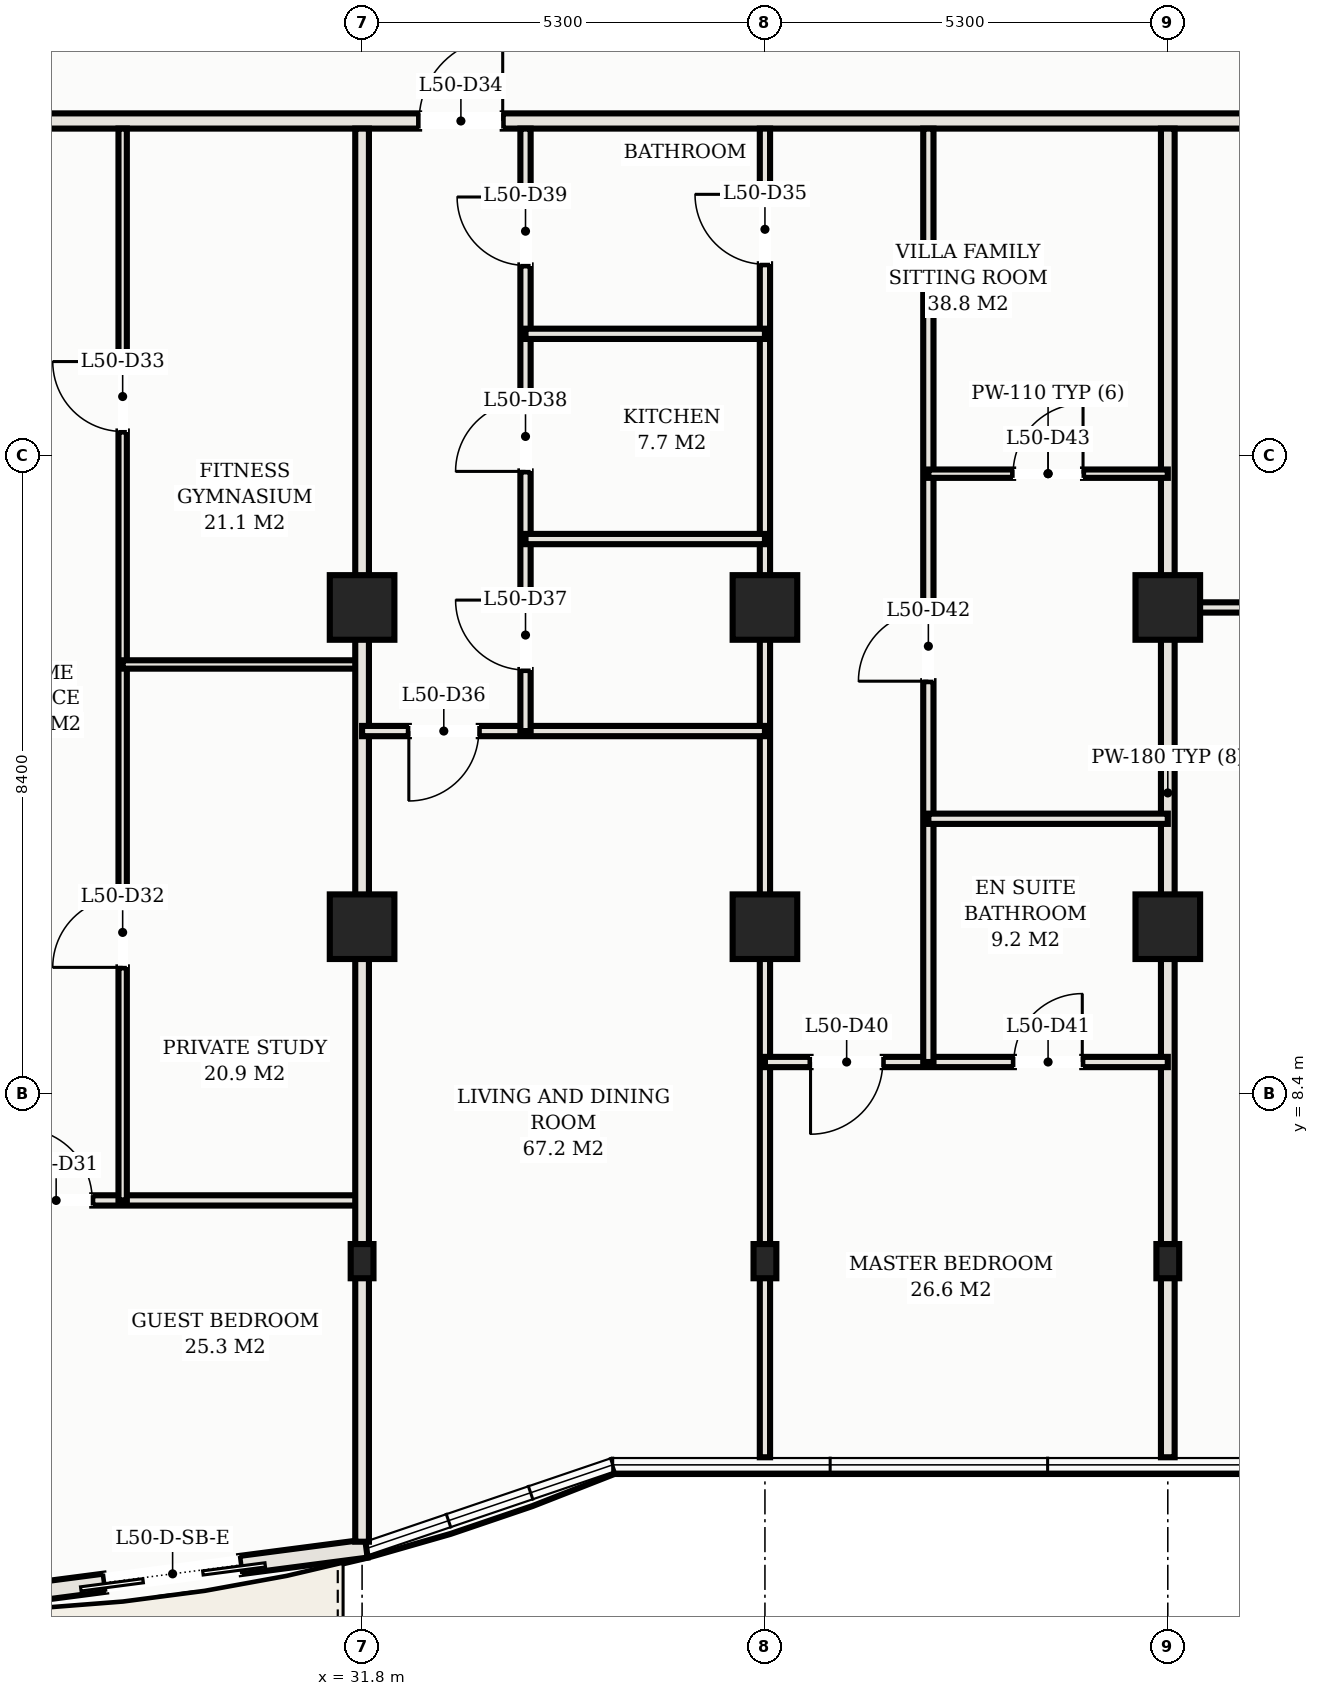
"""IFC4 building model, lengths in metres.
Left out: names, types, materials, properties, quantities, classifications, styles, units other than length and angle.
Written with IfcOpenShell. Run it as: python <this file> out.ifc"""

import sys

from ifc_helpers import new_model, si_unit, direction, frame, frame_2d, origin, origin_2d, place, context, subcontext, project, spatial, rectangle, hollow_rectangle, extrude, element, fill, save


model = new_model("IFC4")
c1 = context("Model", 3, precision=1e-05, world=origin(), true_north=direction((0.0, 1.0)))
c2 = subcontext(c1, "Body", "Model", "MODEL_VIEW")
j1 = project(units=[si_unit("LENGTHUNIT", "METRE"), si_unit("PLANEANGLEUNIT", "RADIAN")], contexts=[c1])
p1 = place(None, origin())
s1 = spatial("IfcSite", under=j1, at=p1, CompositionType="ELEMENT")
p2 = place(p1, origin())
s2 = spatial("IfcBuilding", under=s1, at=p2, CompositionType="ELEMENT")
p3 = place(p2, frame((0.0, 0.0, 182.1)))
s3 = spatial("IfcBuildingStorey", under=s2, at=p3, CompositionType="ELEMENT", Elevation=182.1)
for number, where, z_axis, x_axis in (
    (1, (31.8, 14.8, 0.0), (0.0, 0.0, 1.0), (1.0, 0.0, 0.0)),
    (2, (31.8, 10.6, 0.0), (0.0, 0.0, 1.0), (1.0, 0.0, 0.0)),
    (3, (37.1, 14.8, 0.0), (0.0, 0.0, 1.0), (1.0, 0.0, 0.0)),
    (4, (37.1, 10.6, 0.0), (0.0, 0.0, 1.0), (1.0, 0.0, 0.0)),
    (5, (42.4, 14.8, 0.0), (0.0, 0.0, 1.0), (1.0, 0.0, 0.0)),
    (6, (42.4, 10.6, 0.0), (0.0, 0.0, 1.0), (1.0, 0.0, 0.0)),
):
    element("IfcColumn", number, at=place(p3, frame(where, z_axis=z_axis, x_axis=x_axis)), inside=s3, PredefinedType="COLUMN", context=c2, shape_type="SweptSolid", body=[
        extrude(hollow_rectangle(XDim=0.85, YDim=0.85, WallThickness=0.028, at=origin_2d()), origin(), (0.0, 0.0, 1.0), 3.3),
    ])
for number, where, z_axis, x_axis in (
    (7, (31.8, 6.2, 0.0), (0.0, 0.0, 1.0), (1.0, 0.0, 0.0)),
    (8, (37.1, 6.2, 0.0), (0.0, 0.0, 1.0), (1.0, 0.0, 0.0)),
    (9, (42.4, 6.2, 0.0), (0.0, 0.0, 1.0), (1.0, 0.0, 0.0)),
):
    element("IfcColumn", number, at=place(p3, frame(where, z_axis=z_axis, x_axis=x_axis)), inside=s3, PredefinedType="COLUMN", context=c2, shape_type="SweptSolid", body=[
        extrude(hollow_rectangle(XDim=0.3, YDim=0.45, WallThickness=0.016, at=origin_2d()), origin(), (0.0, 0.0, 1.0), 3.3),
    ])
p4 = place(p3, frame((26.5, 1.72, 0.0), z_axis=(0.0, 0.0, 1.0), x_axis=(0.991594614239, 0.129383619568, 0.0)))
e10 = element("IfcWall", 10, at=p4, inside=s3, PredefinedType="SOLIDWALL", context=c2, shape_type="SweptSolid", body=[
    extrude(rectangle(XDim=5.402, YDim=0.24, at=frame_2d((2.701, 0.0))), origin(), (0.0, 0.0, 1.0), 3.03),
])
p5 = place(p4, frame((1.931, 0.0, 0.0)))
e11 = element("IfcOpeningElement", 11, at=p5, cuts=e10, PredefinedType="OPENING", context=c2, shape_type="SweptSolid", body=[
    extrude(rectangle(XDim=1.8, YDim=2.2, at=frame_2d((0.9, 1.1))), frame((0.0, 0.13, 0.0), z_axis=(0.0, -1.0, 0.0), x_axis=(1.0, 0.0, 0.0)), (0.0, 0.0, 1.0), 0.26),
])
p6 = place(p3, frame((4.32, 21.2, 0.0), z_axis=(0.0, 0.0, 1.0), x_axis=(1.0, 0.0, 0.0)))
e12 = element("IfcWall", 12, at=p6, inside=s3, PredefinedType="PARTITIONING", context=c2, shape_type="SweptSolid", body=[
    extrude(rectangle(XDim=44.36, YDim=0.2, at=frame_2d((22.18, 0.0))), origin(), (0.0, 0.0, 1.0), 2.57),
])
p7 = place(p6, frame((7.03, 0.0, 0.0)))
e13 = element("IfcOpeningElement", 13, at=p7, cuts=e12, PredefinedType="OPENING", context=c2, shape_type="SweptSolid", body=[
    extrude(rectangle(XDim=1.1, YDim=2.25, at=frame_2d((0.55, 1.125))), frame((0.0, 0.11, 0.0), z_axis=(0.0, -1.0, 0.0), x_axis=(1.0, 0.0, 0.0)), (0.0, 0.0, 1.0), 0.22),
])
p8 = place(p6, frame((28.23, 0.0, 0.0)))
e14 = element("IfcOpeningElement", 14, at=p8, cuts=e12, PredefinedType="OPENING", context=c2, shape_type="SweptSolid", body=[
    extrude(rectangle(XDim=1.1, YDim=2.25, at=frame_2d((0.55, 1.125))), frame((0.0, 0.11, 0.0), z_axis=(0.0, -1.0, 0.0), x_axis=(1.0, 0.0, 0.0)), (0.0, 0.0, 1.0), 0.22),
])
p9 = place(p6, frame((2.635, 0.0, 0.0)))
e15 = element("IfcOpeningElement", 15, at=p9, cuts=e12, PredefinedType="OPENING", context=c2, shape_type="SweptSolid", body=[
    extrude(rectangle(XDim=0.92, YDim=2.15, at=frame_2d((0.46, 1.075))), frame((0.0, 0.11, 0.0), z_axis=(0.0, -1.0, 0.0), x_axis=(1.0, 0.0, 0.0)), (0.0, 0.0, 1.0), 0.22),
])
p10 = place(p6, frame((40.805, 0.0, 0.0)))
e16 = element("IfcOpeningElement", 16, at=p10, cuts=e12, PredefinedType="OPENING", context=c2, shape_type="SweptSolid", body=[
    extrude(rectangle(XDim=0.92, YDim=2.15, at=frame_2d((0.46, 1.075))), frame((0.0, 0.11, 0.0), z_axis=(0.0, -1.0, 0.0), x_axis=(1.0, 0.0, 0.0)), (0.0, 0.0, 1.0), 0.22),
])
p11 = place(p3, frame((42.4, 3.62, 0.0), z_axis=(0.0, 0.0, 1.0), x_axis=(0.0, 1.0, 0.0)))
e17 = element("IfcWall", 17, at=p11, inside=s3, PredefinedType="PARTITIONING", context=c2, shape_type="SweptSolid", body=[
    extrude(rectangle(XDim=17.48, YDim=0.18, at=frame_2d((8.74, 0.0))), origin(), (0.0, 0.0, 1.0), 2.325),
])
p12 = place(p3, frame((26.5, 6.999, 0.0), z_axis=(0.0, 0.0, 1.0), x_axis=(1.0, 0.0, 0.0)))
e18 = element("IfcWall", 18, at=p12, inside=s3, PredefinedType="PARTITIONING", context=c2, shape_type="SweptSolid", body=[
    extrude(rectangle(XDim=5.3, YDim=0.135, at=frame_2d((2.65, 0.0))), origin(), (0.0, 0.0, 1.0), 2.57),
])
p13 = place(p12, frame((0.8, 0.0, 0.0)))
e19 = element("IfcOpeningElement", 19, at=p13, cuts=e18, PredefinedType="OPENING", context=c2, shape_type="SweptSolid", body=[
    extrude(rectangle(XDim=0.95, YDim=2.15, at=frame_2d((0.475, 1.075))), frame((0.0, 0.078, 0.0), z_axis=(0.0, -1.0, 0.0), x_axis=(1.0, 0.0, 0.0)), (0.0, 0.0, 1.0), 0.155),
])
p14 = place(p3, frame((28.65, 6.999, 0.0), z_axis=(0.0, 0.0, 1.0), x_axis=(0.0, 1.0, 0.0)))
e20 = element("IfcWall", 20, at=p14, inside=s3, PredefinedType="MOVABLE", context=c2, shape_type="SweptSolid", body=[
    extrude(rectangle(XDim=14.101, YDim=0.11, at=frame_2d((7.051, 0.0))), origin(), (0.0, 0.0, 1.0), 2.57),
])
p15 = place(p14, frame((3.066, 0.0, 0.0)))
e21 = element("IfcOpeningElement", 21, at=p15, cuts=e20, PredefinedType="OPENING", context=c2, shape_type="SweptSolid", body=[
    extrude(rectangle(XDim=0.92, YDim=2.15, at=frame_2d((0.46, 1.075))), frame((0.0, 0.065, 0.0), z_axis=(0.0, -1.0, 0.0), x_axis=(1.0, 0.0, 0.0)), (0.0, 0.0, 1.0), 0.13),
])
p16 = place(p14, frame((10.116, 0.0, 0.0)))
e22 = element("IfcOpeningElement", 22, at=p16, cuts=e20, PredefinedType="OPENING", context=c2, shape_type="SweptSolid", body=[
    extrude(rectangle(XDim=0.92, YDim=2.15, at=frame_2d((0.46, 1.075))), frame((0.0, 0.065, 0.0), z_axis=(0.0, -1.0, 0.0), x_axis=(1.0, 0.0, 0.0)), (0.0, 0.0, 1.0), 0.13),
])
p17 = place(p3, frame((28.65, 14.05, 0.0), z_axis=(0.0, 0.0, 1.0), x_axis=(1.0, 0.0, 0.0)))
e23 = element("IfcWall", 23, at=p17, inside=s3, PredefinedType="MOVABLE", context=c2, shape_type="SweptSolid", body=[
    extrude(rectangle(XDim=3.15, YDim=0.11, at=frame_2d((1.575, 0.0))), origin(), (0.0, 0.0, 1.0), 2.57),
])
p18 = place(p3, frame((31.8, 2.509, 0.0), z_axis=(0.0, 0.0, 1.0), x_axis=(0.0, 1.0, 0.0)))
e24 = element("IfcWall", 24, at=p18, inside=s3, PredefinedType="PARTITIONING", context=c2, shape_type="SweptSolid", body=[
    extrude(rectangle(XDim=18.591, YDim=0.18, at=frame_2d((9.295, 0.0))), origin(), (0.0, 0.0, 1.0), 2.325),
])
p19 = place(p3, frame((37.1, 3.62, 0.0), z_axis=(0.0, 0.0, 1.0), x_axis=(0.0, 1.0, 0.0)))
e25 = element("IfcWall", 25, at=p19, inside=s3, PredefinedType="PARTITIONING", context=c2, shape_type="SweptSolid", body=[
    extrude(rectangle(XDim=17.48, YDim=0.135, at=frame_2d((8.74, 0.0))), origin(), (0.0, 0.0, 1.0), 2.325),
])
p20 = place(p19, frame((15.695, 0.0, 0.0)))
e26 = element("IfcOpeningElement", 26, at=p20, cuts=e25, PredefinedType="OPENING", context=c2, shape_type="SweptSolid", body=[
    extrude(rectangle(XDim=0.92, YDim=2.15, at=frame_2d((0.46, 1.075))), frame((0.0, 0.078, 0.0), z_axis=(0.0, -1.0, 0.0), x_axis=(1.0, 0.0, 0.0)), (0.0, 0.0, 1.0), 0.155),
])
p21 = place(p3, frame((31.8, 13.174, 0.0), z_axis=(0.0, 0.0, 1.0), x_axis=(1.0, 0.0, 0.0)))
e27 = element("IfcWall", 27, at=p21, inside=s3, PredefinedType="PARTITIONING", context=c2, shape_type="SweptSolid", body=[
    extrude(rectangle(XDim=5.3, YDim=0.135, at=frame_2d((2.65, 0.0))), origin(), (0.0, 0.0, 1.0), 2.57),
])
p22 = place(p21, frame((0.615, 0.0, 0.0)))
e28 = element("IfcOpeningElement", 28, at=p22, cuts=e27, PredefinedType="OPENING", context=c2, shape_type="SweptSolid", body=[
    extrude(rectangle(XDim=0.92, YDim=2.15, at=frame_2d((0.46, 1.075))), frame((0.0, 0.078, 0.0), z_axis=(0.0, -1.0, 0.0), x_axis=(1.0, 0.0, 0.0)), (0.0, 0.0, 1.0), 0.155),
])
p23 = place(p3, frame((33.95, 13.174, 0.0), z_axis=(0.0, 0.0, 1.0), x_axis=(0.0, 1.0, 0.0)))
e29 = element("IfcWall", 29, at=p23, inside=s3, PredefinedType="PARTITIONING", context=c2, shape_type="SweptSolid", body=[
    extrude(rectangle(XDim=7.926, YDim=0.135, at=frame_2d((3.963, 0.0))), origin(), (0.0, 0.0, 1.0), 2.57),
])
p24 = place(p23, frame((0.803, 0.0, 0.0)))
e30 = element("IfcOpeningElement", 30, at=p24, cuts=e29, PredefinedType="OPENING", context=c2, shape_type="SweptSolid", body=[
    extrude(rectangle(XDim=0.92, YDim=2.15, at=frame_2d((0.46, 1.075))), frame((0.0, 0.078, 0.0), z_axis=(0.0, -1.0, 0.0), x_axis=(1.0, 0.0, 0.0)), (0.0, 0.0, 1.0), 0.155),
])
p25 = place(p23, frame((3.416, 0.0, 0.0)))
e31 = element("IfcOpeningElement", 31, at=p25, cuts=e29, PredefinedType="OPENING", context=c2, shape_type="SweptSolid", body=[
    extrude(rectangle(XDim=0.92, YDim=2.15, at=frame_2d((0.46, 1.075))), frame((0.0, 0.078, 0.0), z_axis=(0.0, -1.0, 0.0), x_axis=(1.0, 0.0, 0.0)), (0.0, 0.0, 1.0), 0.155),
])
p26 = place(p23, frame((6.126, 0.0, 0.0)))
e32 = element("IfcOpeningElement", 32, at=p26, cuts=e29, PredefinedType="OPENING", context=c2, shape_type="SweptSolid", body=[
    extrude(rectangle(XDim=0.9, YDim=2.15, at=frame_2d((0.45, 1.075))), frame((0.0, 0.078, 0.0), z_axis=(0.0, -1.0, 0.0), x_axis=(1.0, 0.0, 0.0)), (0.0, 0.0, 1.0), 0.155),
])
for number, where, z_axis, x_axis in (
    (33, (33.95, 15.7, 0.0), (0.0, 0.0, 1.0), (1.0, 0.0, 0.0)),
    (34, (33.95, 18.4, 0.0), (0.0, 0.0, 1.0), (1.0, 0.0, 0.0)),
):
    element("IfcWall", number, at=place(p3, frame(where, z_axis=z_axis, x_axis=x_axis)), inside=s3, PredefinedType="PARTITIONING", context=c2, shape_type="SweptSolid", body=[
        extrude(rectangle(XDim=3.15, YDim=0.135, at=frame_2d((1.575, 0.0))), origin(), (0.0, 0.0, 1.0), 2.57),
    ])
p27 = place(p3, frame((37.1, 8.82, 0.0), z_axis=(0.0, 0.0, 1.0), x_axis=(1.0, 0.0, 0.0)))
e35 = element("IfcWall", 35, at=p27, inside=s3, PredefinedType="PARTITIONING", context=c2, shape_type="SweptSolid", body=[
    extrude(rectangle(XDim=5.3, YDim=0.135, at=frame_2d((2.65, 0.0))), origin(), (0.0, 0.0, 1.0), 2.57),
])
p28 = place(p27, frame((0.6, 0.0, 0.0)))
e36 = element("IfcOpeningElement", 36, at=p28, cuts=e35, PredefinedType="OPENING", context=c2, shape_type="SweptSolid", body=[
    extrude(rectangle(XDim=0.95, YDim=2.15, at=frame_2d((0.475, 1.075))), frame((0.0, 0.078, 0.0), z_axis=(0.0, -1.0, 0.0), x_axis=(1.0, 0.0, 0.0)), (0.0, 0.0, 1.0), 0.155),
])
p29 = place(p27, frame((3.275, 0.0, 0.0)))
e37 = element("IfcOpeningElement", 37, at=p29, cuts=e35, PredefinedType="OPENING", context=c2, shape_type="SweptSolid", body=[
    extrude(rectangle(XDim=0.9, YDim=2.15, at=frame_2d((0.45, 1.075))), frame((0.0, 0.078, 0.0), z_axis=(0.0, -1.0, 0.0), x_axis=(1.0, 0.0, 0.0)), (0.0, 0.0, 1.0), 0.155),
])
p30 = place(p3, frame((39.25, 8.82, 0.0), z_axis=(0.0, 0.0, 1.0), x_axis=(0.0, 1.0, 0.0)))
e38 = element("IfcWall", 38, at=p30, inside=s3, PredefinedType="PARTITIONING", context=c2, shape_type="SweptSolid", body=[
    extrude(rectangle(XDim=12.28, YDim=0.135, at=frame_2d((6.14, 0.0))), origin(), (0.0, 0.0, 1.0), 2.57),
])
p31 = place(p30, frame((5.01, 0.0, 0.0)))
e39 = element("IfcOpeningElement", 39, at=p31, cuts=e38, PredefinedType="OPENING", context=c2, shape_type="SweptSolid", body=[
    extrude(rectangle(XDim=0.92, YDim=2.15, at=frame_2d((0.46, 1.075))), frame((0.0, 0.078, 0.0), z_axis=(0.0, -1.0, 0.0), x_axis=(1.0, 0.0, 0.0)), (0.0, 0.0, 1.0), 0.155),
])
p32 = place(p3, frame((39.25, 12.02, 0.0), z_axis=(0.0, 0.0, 1.0), x_axis=(1.0, 0.0, 0.0)))
e40 = element("IfcWall", 40, at=p32, inside=s3, PredefinedType="PARTITIONING", context=c2, shape_type="SweptSolid", body=[
    extrude(rectangle(XDim=3.15, YDim=0.135, at=frame_2d((1.575, 0.0))), origin(), (0.0, 0.0, 1.0), 2.57),
])
p33 = place(p3, frame((39.25, 16.56, 0.0), z_axis=(0.0, 0.0, 1.0), x_axis=(1.0, 0.0, 0.0)))
e41 = element("IfcWall", 41, at=p33, inside=s3, PredefinedType="MOVABLE", context=c2, shape_type="SweptSolid", body=[
    extrude(rectangle(XDim=3.15, YDim=0.11, at=frame_2d((1.575, 0.0))), origin(), (0.0, 0.0, 1.0), 2.57),
])
p34 = place(p33, frame((1.115, 0.0, 0.0)))
e42 = element("IfcOpeningElement", 42, at=p34, cuts=e41, PredefinedType="OPENING", context=c2, shape_type="SweptSolid", body=[
    extrude(rectangle(XDim=0.92, YDim=2.15, at=frame_2d((0.46, 1.075))), frame((0.0, 0.065, 0.0), z_axis=(0.0, -1.0, 0.0), x_axis=(1.0, 0.0, 0.0)), (0.0, 0.0, 1.0), 0.13),
])
p35 = place(p3, frame((42.4, 14.8, 0.0), z_axis=(0.0, 0.0, 1.0), x_axis=(1.0, 0.0, 0.0)))
e43 = element("IfcWall", 43, at=p35, inside=s3, PredefinedType="PARTITIONING", context=c2, shape_type="SweptSolid", body=[
    extrude(rectangle(XDim=6.18, YDim=0.135, at=frame_2d((3.09, 0.0))), origin(), (0.0, 0.0, 1.0), 2.325),
])
p36 = place(p35, frame((2.63, 0.0, 0.0)))
e44 = element("IfcOpeningElement", 44, at=p36, cuts=e43, PredefinedType="OPENING", context=c2, shape_type="SweptSolid", body=[
    extrude(rectangle(XDim=0.92, YDim=2.15, at=frame_2d((0.46, 1.075))), frame((0.0, 0.078, 0.0), z_axis=(0.0, -1.0, 0.0), x_axis=(1.0, 0.0, 0.0)), (0.0, 0.0, 1.0), 0.155),
])
p37 = place(p5, frame((1.8, 0.0, 0.0), z_axis=(0.0, 0.0, 1.0), x_axis=(-1.0, 0.0, 0.0)))
e45 = element("IfcDoor", 45, at=p37, inside=s3, OperationType="DOUBLE_DOOR_SLIDING", PredefinedType="DOOR", context=c2, shape_type="SweptSolid", body=[
    extrude(rectangle(XDim=1.8, YDim=2.2, at=frame_2d((0.9, 1.1))), frame((0.0, 0.025, 0.0), z_axis=(0.0, -1.0, 0.0), x_axis=(1.0, 0.0, 0.0)), (0.0, 0.0, 1.0), 0.05),
])
fill(e11, e45)
p38 = place(p13, origin())
e46 = element("IfcDoor", 46, at=p38, inside=s3, OperationType="SINGLE_SWING_LEFT", PredefinedType="DOOR", context=c2, shape_type="SweptSolid", body=[
    extrude(rectangle(XDim=0.95, YDim=2.15, at=frame_2d((0.475, 1.075))), frame((0.0, 0.025, 0.0), z_axis=(0.0, -1.0, 0.0), x_axis=(1.0, 0.0, 0.0)), (0.0, 0.0, 1.0), 0.05),
])
fill(e19, e46)
p39 = place(p15, origin())
e47 = element("IfcDoor", 47, at=p39, inside=s3, OperationType="SINGLE_SWING_LEFT", PredefinedType="DOOR", context=c2, shape_type="SweptSolid", body=[
    extrude(rectangle(XDim=0.92, YDim=2.15, at=frame_2d((0.46, 1.075))), frame((0.0, 0.025, 0.0), z_axis=(0.0, -1.0, 0.0), x_axis=(1.0, 0.0, 0.0)), (0.0, 0.0, 1.0), 0.05),
])
fill(e21, e47)
p40 = place(p16, origin())
e48 = element("IfcDoor", 48, at=p40, inside=s3, OperationType="SINGLE_SWING_RIGHT", PredefinedType="DOOR", context=c2, shape_type="SweptSolid", body=[
    extrude(rectangle(XDim=0.92, YDim=2.15, at=frame_2d((0.46, 1.075))), frame((0.0, 0.025, 0.0), z_axis=(0.0, -1.0, 0.0), x_axis=(1.0, 0.0, 0.0)), (0.0, 0.0, 1.0), 0.05),
])
fill(e22, e48)
p41 = place(p8, origin())
e49 = element("IfcDoor", 49, at=p41, inside=s3, OperationType="SINGLE_SWING_RIGHT", PredefinedType="DOOR", context=c2, shape_type="SweptSolid", body=[
    extrude(rectangle(XDim=1.1, YDim=2.25, at=frame_2d((0.55, 1.125))), frame((0.0, 0.025, 0.0), z_axis=(0.0, -1.0, 0.0), x_axis=(1.0, 0.0, 0.0)), (0.0, 0.0, 1.0), 0.05),
])
fill(e14, e49)
p42 = place(p20, origin())
e50 = element("IfcDoor", 50, at=p42, inside=s3, OperationType="SINGLE_SWING_RIGHT", PredefinedType="DOOR", context=c2, shape_type="SweptSolid", body=[
    extrude(rectangle(XDim=0.92, YDim=2.15, at=frame_2d((0.46, 1.075))), frame((0.0, 0.025, 0.0), z_axis=(0.0, -1.0, 0.0), x_axis=(1.0, 0.0, 0.0)), (0.0, 0.0, 1.0), 0.05),
])
fill(e26, e50)
p43 = place(p22, frame((0.92, 0.0, 0.0), z_axis=(0.0, 0.0, 1.0), x_axis=(-1.0, 0.0, 0.0)))
e51 = element("IfcDoor", 51, at=p43, inside=s3, OperationType="SINGLE_SWING_RIGHT", PredefinedType="DOOR", context=c2, shape_type="SweptSolid", body=[
    extrude(rectangle(XDim=0.92, YDim=2.15, at=frame_2d((0.46, 1.075))), frame((0.0, 0.025, 0.0), z_axis=(0.0, -1.0, 0.0), x_axis=(1.0, 0.0, 0.0)), (0.0, 0.0, 1.0), 0.05),
])
fill(e28, e51)
p44 = place(p24, origin())
e52 = element("IfcDoor", 52, at=p44, inside=s3, OperationType="SINGLE_SWING_RIGHT", PredefinedType="DOOR", context=c2, shape_type="SweptSolid", body=[
    extrude(rectangle(XDim=0.92, YDim=2.15, at=frame_2d((0.46, 1.075))), frame((0.0, 0.025, 0.0), z_axis=(0.0, -1.0, 0.0), x_axis=(1.0, 0.0, 0.0)), (0.0, 0.0, 1.0), 0.05),
])
fill(e30, e52)
p45 = place(p25, origin())
e53 = element("IfcDoor", 53, at=p45, inside=s3, OperationType="SINGLE_SWING_LEFT", PredefinedType="DOOR", context=c2, shape_type="SweptSolid", body=[
    extrude(rectangle(XDim=0.92, YDim=2.15, at=frame_2d((0.46, 1.075))), frame((0.0, 0.025, 0.0), z_axis=(0.0, -1.0, 0.0), x_axis=(1.0, 0.0, 0.0)), (0.0, 0.0, 1.0), 0.05),
])
fill(e31, e53)
p46 = place(p26, origin())
e54 = element("IfcDoor", 54, at=p46, inside=s3, OperationType="SINGLE_SWING_RIGHT", PredefinedType="DOOR", context=c2, shape_type="SweptSolid", body=[
    extrude(rectangle(XDim=0.9, YDim=2.15, at=frame_2d((0.45, 1.075))), frame((0.0, 0.025, 0.0), z_axis=(0.0, -1.0, 0.0), x_axis=(1.0, 0.0, 0.0)), (0.0, 0.0, 1.0), 0.05),
])
fill(e32, e54)
p47 = place(p28, frame((0.95, 0.0, 0.0), z_axis=(0.0, 0.0, 1.0), x_axis=(-1.0, 0.0, 0.0)))
e55 = element("IfcDoor", 55, at=p47, inside=s3, OperationType="SINGLE_SWING_RIGHT", PredefinedType="DOOR", context=c2, shape_type="SweptSolid", body=[
    extrude(rectangle(XDim=0.95, YDim=2.15, at=frame_2d((0.475, 1.075))), frame((0.0, 0.025, 0.0), z_axis=(0.0, -1.0, 0.0), x_axis=(1.0, 0.0, 0.0)), (0.0, 0.0, 1.0), 0.05),
])
fill(e36, e55)
p48 = place(p29, origin())
e56 = element("IfcDoor", 56, at=p48, inside=s3, OperationType="SINGLE_SWING_RIGHT", PredefinedType="DOOR", context=c2, shape_type="SweptSolid", body=[
    extrude(rectangle(XDim=0.9, YDim=2.15, at=frame_2d((0.45, 1.075))), frame((0.0, 0.025, 0.0), z_axis=(0.0, -1.0, 0.0), x_axis=(1.0, 0.0, 0.0)), (0.0, 0.0, 1.0), 0.05),
])
fill(e37, e56)
p49 = place(p31, origin())
e57 = element("IfcDoor", 57, at=p49, inside=s3, OperationType="SINGLE_SWING_LEFT", PredefinedType="DOOR", context=c2, shape_type="SweptSolid", body=[
    extrude(rectangle(XDim=0.92, YDim=2.15, at=frame_2d((0.46, 1.075))), frame((0.0, 0.025, 0.0), z_axis=(0.0, -1.0, 0.0), x_axis=(1.0, 0.0, 0.0)), (0.0, 0.0, 1.0), 0.05),
])
fill(e39, e57)
p50 = place(p34, origin())
e58 = element("IfcDoor", 58, at=p50, inside=s3, OperationType="SINGLE_SWING_RIGHT", PredefinedType="DOOR", context=c2, shape_type="SweptSolid", body=[
    extrude(rectangle(XDim=0.92, YDim=2.15, at=frame_2d((0.46, 1.075))), frame((0.0, 0.025, 0.0), z_axis=(0.0, -1.0, 0.0), x_axis=(1.0, 0.0, 0.0)), (0.0, 0.0, 1.0), 0.05),
])
fill(e42, e58)
save(model, sys.argv[1])
